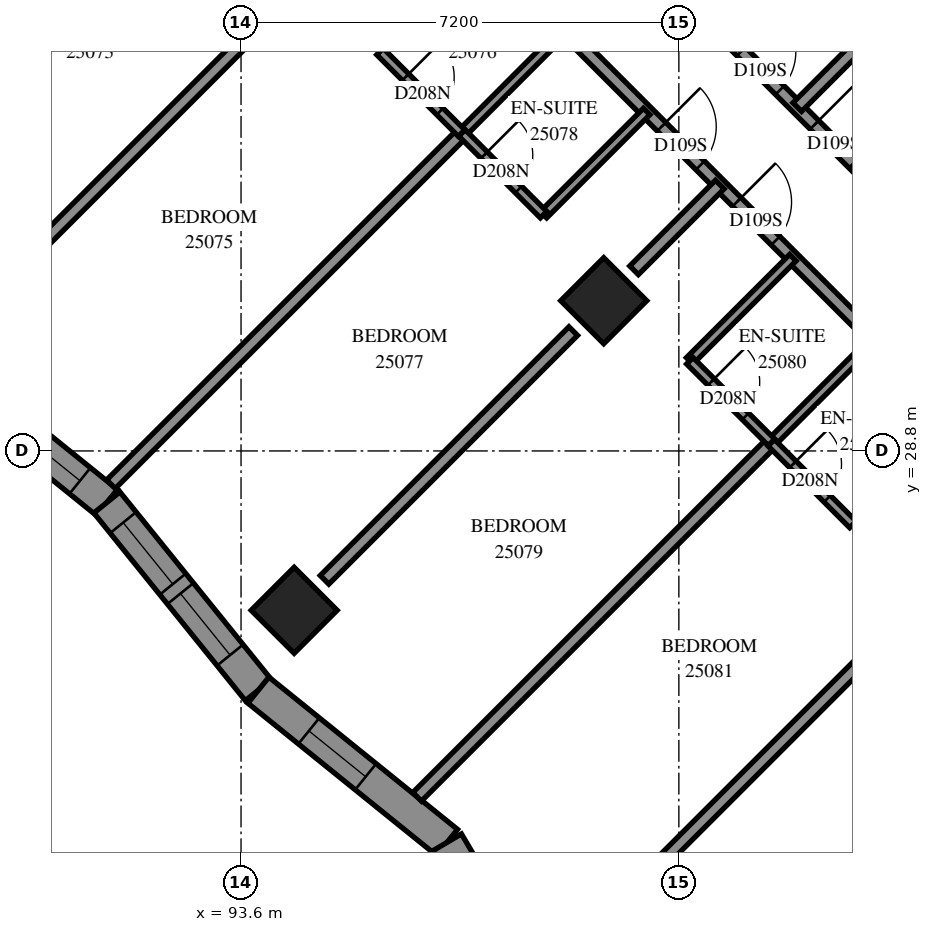
"""IFC4 building model, lengths in metres.
Left out: names, types, materials, properties, quantities, classifications, styles, units other than length and angle.
Written with IfcOpenShell. Run it as: python <this file> out.ifc"""

import sys

from ifc_helpers import new_model, si_unit, direction, frame, frame_2d, origin, origin_2d, place, context, subcontext, project, spatial, polyline, rectangle, outline, extrude, element, fill, save


model = new_model("IFC4")
c1 = context("Model", 3, precision=1e-05, world=origin(), true_north=direction((0.0, 1.0)))
c2 = subcontext(c1, "Body", "Model", "MODEL_VIEW")
j1 = project(units=[si_unit("LENGTHUNIT", "METRE"), si_unit("PLANEANGLEUNIT", "RADIAN")], contexts=[c1])
p1 = place(None, origin())
s1 = spatial("IfcSite", under=j1, at=p1, CompositionType="ELEMENT")
p2 = place(p1, origin())
s2 = spatial("IfcBuilding", under=s1, at=p2, CompositionType="ELEMENT")
p3 = place(p2, frame((0.0, 0.0, 94.8)))
s3 = spatial("IfcBuildingStorey", under=s2, at=p3, CompositionType="ELEMENT", Elevation=94.8)
for number, where, z_axis, x_axis in (
    (1, (99.565, 31.271, 0.0), (0.0, 0.0, 1.0), (0.707, -0.707, 0.0)),
    (2, (94.474, 26.18, 0.0), (0.0, 0.0, 1.0), (0.707, -0.707, 0.0)),
):
    element("IfcColumn", number, at=place(p3, frame(where, z_axis=z_axis, x_axis=x_axis)), inside=s3, PredefinedType="COLUMN", context=c2, shape_type="SweptSolid", body=[
        extrude(rectangle(XDim=1.0, YDim=1.0, at=origin_2d()), origin(), (0.0, 0.0, 1.0), 3.1),
    ])
p4 = place(p3, frame((88.308, 30.444, 0.0), z_axis=(0.0, 0.0, 1.0), x_axis=(0.7781705498, -0.6280530196, 0.0)))
e3 = element("IfcWall", 3, at=p4, inside=s3, PredefinedType="SOLIDWALL", context=c2, shape_type="SweptSolid", body=[
    extrude(outline(polyline([(-0.029, -0.275), (3.937, -0.275), (3.996, 0.275), (0.029, 0.275), (-0.029, -0.275)])), origin(), (0.0, 0.0, 1.0), 3.1),
])
p5 = place(p4, frame((0.598, 0.0, 0.5)))
e4 = element("IfcOpeningElement", 4, at=p5, cuts=e3, PredefinedType="OPENING", context=c2, shape_type="SweptSolid", body=[
    extrude(rectangle(XDim=1.3, YDim=2.45, at=frame_2d((0.65, 1.225))), frame((0.0, 0.285, 0.0), z_axis=(0.0, -1.0, 0.0), x_axis=(1.0, 0.0, 0.0)), (0.0, 0.0, 1.0), 0.57),
])
p6 = place(p4, frame((2.098, 0.0, 0.5)))
e5 = element("IfcOpeningElement", 5, at=p6, cuts=e3, PredefinedType="OPENING", context=c2, shape_type="SweptSolid", body=[
    extrude(rectangle(XDim=1.3, YDim=2.45, at=frame_2d((0.65, 1.225))), frame((0.0, 0.285, 0.0), z_axis=(0.0, -1.0, 0.0), x_axis=(1.0, 0.0, 0.0)), (0.0, 0.0, 1.0), 0.57),
])
p7 = place(p3, frame((91.394, 27.953, 0.0), z_axis=(0.0, 0.0, 1.0), x_axis=(0.6280530196, -0.7781705498, 0.0)))
e6 = element("IfcWall", 6, at=p7, inside=s3, PredefinedType="SOLIDWALL", context=c2, shape_type="SweptSolid", body=[
    extrude(outline(polyline([(0.029, -0.275), (3.996, -0.275), (3.937, 0.275), (-0.029, 0.275), (0.029, -0.275)])), origin(), (0.0, 0.0, 1.0), 3.1),
])
p8 = place(p7, frame((0.425, 0.0, 0.5)))
e7 = element("IfcOpeningElement", 7, at=p8, cuts=e6, PredefinedType="OPENING", context=c2, shape_type="SweptSolid", body=[
    extrude(rectangle(XDim=1.3, YDim=2.45, at=frame_2d((0.65, 1.225))), frame((0.0, 0.285, 0.0), z_axis=(0.0, -1.0, 0.0), x_axis=(1.0, 0.0, 0.0)), (0.0, 0.0, 1.0), 0.57),
])
p9 = place(p7, frame((1.925, 0.0, 0.5)))
e8 = element("IfcOpeningElement", 8, at=p9, cuts=e6, PredefinedType="OPENING", context=c2, shape_type="SweptSolid", body=[
    extrude(rectangle(XDim=1.3, YDim=2.45, at=frame_2d((0.65, 1.225))), frame((0.0, 0.285, 0.0), z_axis=(0.0, -1.0, 0.0), x_axis=(1.0, 0.0, 0.0)), (0.0, 0.0, 1.0), 0.57),
])
p10 = place(p3, frame((93.885, 24.867, 0.0), z_axis=(0.0, 0.0, 1.0), x_axis=(0.7781698309, -0.6280539103, 0.0)))
e9 = element("IfcWall", 9, at=p10, inside=s3, PredefinedType="SOLIDWALL", context=c2, shape_type="SweptSolid", body=[
    extrude(outline(polyline([(-0.029, -0.275), (3.937, -0.275), (4.037, 0.275), (0.029, 0.275), (-0.029, -0.275)])), origin(), (0.0, 0.0, 1.0), 3.1),
])
p11 = place(p10, frame((1.067, 0.0, 0.5)))
e10 = element("IfcOpeningElement", 10, at=p11, cuts=e9, PredefinedType="OPENING", context=c2, shape_type="SweptSolid", body=[
    extrude(rectangle(XDim=1.2, YDim=2.45, at=frame_2d((0.6, 1.225))), frame((0.0, 0.285, 0.0), z_axis=(0.0, -1.0, 0.0), x_axis=(1.0, 0.0, 0.0)), (0.0, 0.0, 1.0), 0.57),
])
p12 = place(p3, frame((96.988, 22.363, 0.0), z_axis=(0.0, 0.0, 1.0), x_axis=(0.507326266, -0.86175406, 0.0)))
e11 = element("IfcWall", 11, at=p12, inside=s3, PredefinedType="SOLIDWALL", context=c2, shape_type="SweptSolid", body=[
    extrude(outline(polyline([(0.05, -0.275), (4.124, -0.275), (3.67, 0.275), (-0.05, 0.275), (0.05, -0.275)])), origin(), (0.0, 0.0, 1.0), 3.1),
])
p13 = place(p12, frame((0.907, 0.0, 0.5)))
e12 = element("IfcOpeningElement", 12, at=p13, cuts=e11, PredefinedType="OPENING", context=c2, shape_type="SweptSolid", body=[
    extrude(rectangle(XDim=1.2, YDim=2.45, at=frame_2d((0.6, 1.225))), frame((0.0, 0.285, 0.0), z_axis=(0.0, -1.0, 0.0), x_axis=(1.0, 0.0, 0.0)), (0.0, 0.0, 1.0), 0.57),
])
p14 = place(p3, frame((93.339, 41.309, 0.0), z_axis=(0.0, 0.0, 1.0), x_axis=(0.7071067812, -0.7071067812, 0.0)))
e13 = element("IfcWall", 13, at=p14, inside=s3, PredefinedType="PARTITIONING", context=c2, shape_type="SweptSolid", body=[
    extrude(rectangle(XDim=18.702, YDim=0.2, at=frame_2d((9.351, 0.0))), origin(), (0.0, 0.0, 1.0), 3.1),
])
p15 = place(p14, frame((3.05, 0.0, 0.0)))
e14 = element("IfcOpeningElement", 14, at=p15, cuts=e13, PredefinedType="OPENING", context=c2, shape_type="SweptSolid", body=[
    extrude(rectangle(XDim=0.9, YDim=2.1, at=frame_2d((0.45, 1.05))), frame((0.0, 0.11, 0.0), z_axis=(0.0, -1.0, 0.0), x_axis=(1.0, 0.0, 0.0)), (0.0, 0.0, 1.0), 0.22),
])
p16 = place(p14, frame((4.7, 0.0, 0.0)))
e15 = element("IfcOpeningElement", 15, at=p16, cuts=e13, PredefinedType="OPENING", context=c2, shape_type="SweptSolid", body=[
    extrude(rectangle(XDim=0.9, YDim=2.1, at=frame_2d((0.45, 1.05))), frame((0.0, 0.11, 0.0), z_axis=(0.0, -1.0, 0.0), x_axis=(1.0, 0.0, 0.0)), (0.0, 0.0, 1.0), 0.22),
])
p17 = place(p14, frame((10.149, 0.0, 0.0)))
e16 = element("IfcOpeningElement", 16, at=p17, cuts=e13, PredefinedType="OPENING", context=c2, shape_type="SweptSolid", body=[
    extrude(rectangle(XDim=0.9, YDim=2.1, at=frame_2d((0.45, 1.05))), frame((0.0, 0.11, 0.0), z_axis=(0.0, -1.0, 0.0), x_axis=(1.0, 0.0, 0.0)), (0.0, 0.0, 1.0), 0.22),
])
p18 = place(p14, frame((11.9, 0.0, 0.0)))
e17 = element("IfcOpeningElement", 17, at=p18, cuts=e13, PredefinedType="OPENING", context=c2, shape_type="SweptSolid", body=[
    extrude(rectangle(XDim=0.9, YDim=2.1, at=frame_2d((0.45, 1.05))), frame((0.0, 0.11, 0.0), z_axis=(0.0, -1.0, 0.0), x_axis=(1.0, 0.0, 0.0)), (0.0, 0.0, 1.0), 0.22),
])
p19 = place(p14, frame((17.45, 0.0, 0.0)))
e18 = element("IfcOpeningElement", 18, at=p19, cuts=e13, PredefinedType="OPENING", context=c2, shape_type="SweptSolid", body=[
    extrude(rectangle(XDim=0.9, YDim=2.1, at=frame_2d((0.45, 1.05))), frame((0.0, 0.11, 0.0), z_axis=(0.0, -1.0, 0.0), x_axis=(1.0, 0.0, 0.0)), (0.0, 0.0, 1.0), 0.22),
])
p20 = place(p3, frame((86.835, 34.806, 0.0), z_axis=(0.0, 0.0, 1.0), x_axis=(0.7071067812, 0.7071067812, 0.0)))
e19 = element("IfcWall", 19, at=p20, inside=s3, PredefinedType="PARTITIONING", context=c2, shape_type="SweptSolid", body=[
    extrude(rectangle(XDim=9.201, YDim=0.2, at=frame_2d((4.601, 0.0))), origin(), (0.0, 0.0, 1.0), 3.1),
])
p21 = place(p3, frame((96.496, 23.113, 0.0), z_axis=(0.0, 0.0, 1.0), x_axis=(0.7071067812, 0.7071067812, 0.0)))
e20 = element("IfcWall", 20, at=p21, inside=s3, PredefinedType="PARTITIONING", context=c2, shape_type="SweptSolid", body=[
    extrude(rectangle(XDim=8.24, YDim=0.2, at=frame_2d((4.12, 0.0))), origin(), (0.0, 0.0, 1.0), 3.1),
])
p22 = place(p3, frame((86.343, 33.316, 0.0), z_axis=(0.0, 0.0, 1.0), x_axis=(0.7069848641, 0.7072286772, 0.0)))
e21 = element("IfcWall", 21, at=p22, inside=s3, PredefinedType="PARTITIONING", context=c2, shape_type="SweptSolid", body=[
    extrude(rectangle(XDim=8.203, YDim=0.2, at=frame_2d((4.101, 0.0))), origin(), (0.0, 0.0, 1.0), 3.1),
])
p23 = place(p3, frame((91.461, 28.253, 0.0), z_axis=(0.0, 0.0, 1.0), x_axis=(0.7072231255, 0.7069904178, 0.0)))
e22 = element("IfcWall", 22, at=p23, inside=s3, PredefinedType="PARTITIONING", context=c2, shape_type="SweptSolid", body=[
    extrude(rectangle(XDim=8.165, YDim=0.2, at=frame_2d((4.082, 0.0))), origin(), (0.0, 0.0, 1.0), 3.1),
])
p24 = place(p3, frame((100.062, 21.588, 0.0), z_axis=(0.0, 0.0, 1.0), x_axis=(0.7071067812, 0.7071067812, 0.0)))
e23 = element("IfcWall", 23, at=p24, inside=s3, PredefinedType="PARTITIONING", context=c2, shape_type="SweptSolid", body=[
    extrude(rectangle(XDim=5.79, YDim=0.2, at=frame_2d((2.895, 0.0))), origin(), (0.0, 0.0, 1.0), 2.6),
])
p25 = place(p3, frame((89.881, 31.771, 0.0), z_axis=(0.0, 0.0, 1.0), x_axis=(0.7071067812, 0.7071067812, 0.0)))
e24 = element("IfcWall", 24, at=p25, inside=s3, PredefinedType="PARTITIONING", context=c2, shape_type="SweptSolid", body=[
    extrude(rectangle(XDim=5.787, YDim=0.2, at=frame_2d((2.893, 0.0))), origin(), (0.0, 0.0, 1.0), 3.1),
])
p26 = place(p3, frame((94.973, 26.681, 0.0), z_axis=(0.0, 0.0, 1.0), x_axis=(0.7071067812, 0.7071067812, 0.0)))
e25 = element("IfcWall", 25, at=p26, inside=s3, PredefinedType="PARTITIONING", context=c2, shape_type="SweptSolid", body=[
    extrude(rectangle(XDim=5.784, YDim=0.2, at=frame_2d((2.892, 0.0))), origin(), (0.0, 0.0, 1.0), 3.1),
])
p27 = place(p3, frame((101.541, 35.651, 0.0), z_axis=(0.0, 0.0, 1.0), x_axis=(0.7071067812, -0.7071067812, 0.0)))
e26 = element("IfcWall", 26, at=p27, inside=s3, PredefinedType="PARTITIONING", context=c2, shape_type="SweptSolid", body=[
    extrude(rectangle(XDim=3.4, YDim=0.2, at=frame_2d((1.7, 0.0))), origin(), (0.0, 0.0, 1.0), 3.1),
])
p28 = place(p27, frame((0.4, 0.0, 0.0)))
e27 = element("IfcOpeningElement", 27, at=p28, cuts=e26, PredefinedType="OPENING", context=c2, shape_type="SweptSolid", body=[
    extrude(rectangle(XDim=0.9, YDim=2.1, at=frame_2d((0.45, 1.05))), frame((0.0, 0.11, 0.0), z_axis=(0.0, -1.0, 0.0), x_axis=(1.0, 0.0, 0.0)), (0.0, 0.0, 1.0), 0.22),
])
p29 = place(p27, frame((2.105, 0.0, 0.0)))
e28 = element("IfcOpeningElement", 28, at=p29, cuts=e26, PredefinedType="OPENING", context=c2, shape_type="SweptSolid", body=[
    extrude(rectangle(XDim=0.9, YDim=2.1, at=frame_2d((0.45, 1.05))), frame((0.0, 0.11, 0.0), z_axis=(0.0, -1.0, 0.0), x_axis=(1.0, 0.0, 0.0)), (0.0, 0.0, 1.0), 0.22),
])
for number, where, z_axis, x_axis in (
    (29, (100.977, 30.281, 0.0), (0.0, 0.0, 1.0), (0.707, 0.707, 0.0)),
    (30, (98.573, 32.685, 0.0), (0.0, 0.0, 1.0), (0.707, 0.707, 0.0)),
):
    element("IfcWall", number, at=place(p3, frame(where, z_axis=z_axis, x_axis=x_axis)), inside=s3, PredefinedType="PARTITIONING", context=c2, shape_type="SweptSolid", body=[
        extrude(rectangle(XDim=2.401, YDim=0.15, at=frame_2d((1.201, 0.0))), origin(), (0.0, 0.0, 1.0), 3.1),
    ])
p30 = place(p3, frame((97.234, 34.026, 0.0), z_axis=(0.0, 0.0, 1.0), x_axis=(0.706689978, 0.7075233388, 0.0)))
e31 = element("IfcWall", 31, at=p30, inside=s3, PredefinedType="PARTITIONING", context=c2, shape_type="SweptSolid", body=[
    extrude(rectangle(XDim=2.4, YDim=0.15, at=frame_2d((1.2, 0.0))), origin(), (0.0, 0.0, 1.0), 3.1),
])
for number, where, z_axis, x_axis in (
    (32, (95.887, 35.373, 0.0), (0.0, 0.0, 1.0), (0.707, 0.707, 0.0)),
    (33, (102.323, 28.939, 0.0), (0.0, 0.0, 1.0), (0.707, 0.707, 0.0)),
    (34, (103.665, 27.595, 0.0), (0.0, 0.0, 1.0), (0.707, 0.707, 0.0)),
):
    element("IfcWall", number, at=place(p3, frame(where, z_axis=z_axis, x_axis=x_axis)), inside=s3, PredefinedType="PARTITIONING", context=c2, shape_type="SweptSolid", body=[
        extrude(rectangle(XDim=2.398, YDim=0.15, at=frame_2d((1.199, 0.0))), origin(), (0.0, 0.0, 1.0), 3.1),
    ])
p31 = place(p3, frame((100.063, 31.771, 0.0), z_axis=(0.0, 0.0, 1.0), x_axis=(0.7071067812, 0.7071067812, 0.0)))
e35 = element("IfcWall", 35, at=p31, inside=s3, PredefinedType="PARTITIONING", context=c2, shape_type="SweptSolid", body=[
    extrude(rectangle(XDim=1.994, YDim=0.2, at=frame_2d((0.997, 0.0))), origin(), (0.0, 0.0, 1.0), 3.1),
])
p32 = place(p3, frame((102.747, 34.455, 0.0), z_axis=(0.0, 0.0, 1.0), x_axis=(0.7071067812, 0.7071067812, 0.0)))
e36 = element("IfcWall", 36, at=p32, inside=s3, PredefinedType="PARTITIONING", context=c2, shape_type="SweptSolid", body=[
    extrude(rectangle(XDim=1.991, YDim=0.2, at=frame_2d((0.996, 0.0))), origin(), (0.0, 0.0, 1.0), 3.1),
])
p33 = place(p3, frame((95.885, 35.369, 0.0), z_axis=(0.0, 0.0, 1.0), x_axis=(0.7071067812, -0.7071067812, 0.0)))
e37 = element("IfcWall", 37, at=p33, inside=s3, PredefinedType="PARTITIONING", context=c2, shape_type="SweptSolid", body=[
    extrude(rectangle(XDim=1.901, YDim=0.15, at=frame_2d((0.95, 0.0))), origin(), (0.0, 0.0, 1.0), 3.1),
])
p34 = place(p33, frame((0.595, 0.0, 0.0)))
e38 = element("IfcOpeningElement", 38, at=p34, cuts=e37, PredefinedType="OPENING", context=c2, shape_type="SweptSolid", body=[
    extrude(rectangle(XDim=0.8, YDim=2.1, at=frame_2d((0.4, 1.05))), frame((0.0, 0.085, 0.0), z_axis=(0.0, -1.0, 0.0), x_axis=(1.0, 0.0, 0.0)), (0.0, 0.0, 1.0), 0.17),
])
p35 = place(p3, frame((100.981, 30.283, 0.0), z_axis=(0.0, 0.0, 1.0), x_axis=(0.7076330979, -0.7065800724, 0.0)))
e39 = element("IfcWall", 39, at=p35, inside=s3, PredefinedType="PARTITIONING", context=c2, shape_type="SweptSolid", body=[
    extrude(rectangle(XDim=1.899, YDim=0.15, at=frame_2d((0.95, 0.0))), origin(), (0.0, 0.0, 1.0), 3.1),
])
p36 = place(p35, frame((0.493, 0.0, 0.0)))
e40 = element("IfcOpeningElement", 40, at=p36, cuts=e39, PredefinedType="OPENING", context=c2, shape_type="SweptSolid", body=[
    extrude(rectangle(XDim=0.8, YDim=2.1, at=frame_2d((0.4, 1.05))), frame((0.0, 0.085, 0.0), z_axis=(0.0, -1.0, 0.0), x_axis=(1.0, 0.0, 0.0)), (0.0, 0.0, 1.0), 0.17),
])
p37 = place(p3, frame((97.233, 34.029, 0.0), z_axis=(0.0, 0.0, 1.0), x_axis=(0.7065800724, -0.7076330979, 0.0)))
e41 = element("IfcWall", 41, at=p37, inside=s3, PredefinedType="PARTITIONING", context=c2, shape_type="SweptSolid", body=[
    extrude(rectangle(XDim=1.899, YDim=0.15, at=frame_2d((0.95, 0.0))), origin(), (0.0, 0.0, 1.0), 3.1),
])
p38 = place(p37, frame((0.515, 0.0, 0.0)))
e42 = element("IfcOpeningElement", 42, at=p38, cuts=e41, PredefinedType="OPENING", context=c2, shape_type="SweptSolid", body=[
    extrude(rectangle(XDim=0.8, YDim=2.1, at=frame_2d((0.4, 1.05))), frame((0.0, 0.085, 0.0), z_axis=(0.0, -1.0, 0.0), x_axis=(1.0, 0.0, 0.0)), (0.0, 0.0, 1.0), 0.17),
])
p39 = place(p3, frame((102.321, 28.935, 0.0), z_axis=(0.0, 0.0, 1.0), x_axis=(0.7065800724, -0.7076330979, 0.0)))
e43 = element("IfcWall", 43, at=p39, inside=s3, PredefinedType="PARTITIONING", context=c2, shape_type="SweptSolid", body=[
    extrude(rectangle(XDim=1.899, YDim=0.15, at=frame_2d((0.95, 0.0))), origin(), (0.0, 0.0, 1.0), 3.1),
])
p40 = place(p39, frame((0.501, 0.0, 0.0)))
e44 = element("IfcOpeningElement", 44, at=p40, cuts=e43, PredefinedType="OPENING", context=c2, shape_type="SweptSolid", body=[
    extrude(rectangle(XDim=0.8, YDim=2.1, at=frame_2d((0.4, 1.05))), frame((0.0, 0.085, 0.0), z_axis=(0.0, -1.0, 0.0), x_axis=(1.0, 0.0, 0.0)), (0.0, 0.0, 1.0), 0.17),
])
p41 = place(p6, origin())
e45 = element("IfcWindow", 45, at=p41, inside=s3, PartitioningType="SINGLE_PANEL", PredefinedType="WINDOW", context=c2, shape_type="SweptSolid", body=[
    extrude(rectangle(XDim=1.3, YDim=2.45, at=frame_2d((0.65, 1.225))), frame((0.0, 0.155, 0.0), z_axis=(0.0, -1.0, 0.0), x_axis=(1.0, 0.0, 0.0)), (0.0, 0.0, 1.0), 0.06),
])
fill(e5, e45)
p42 = place(p8, origin())
e46 = element("IfcWindow", 46, at=p42, inside=s3, PartitioningType="SINGLE_PANEL", PredefinedType="WINDOW", context=c2, shape_type="SweptSolid", body=[
    extrude(rectangle(XDim=1.3, YDim=2.45, at=frame_2d((0.65, 1.225))), frame((0.0, 0.155, 0.0), z_axis=(0.0, -1.0, 0.0), x_axis=(1.0, 0.0, 0.0)), (0.0, 0.0, 1.0), 0.06),
])
fill(e7, e46)
p43 = place(p9, origin())
e47 = element("IfcWindow", 47, at=p43, inside=s3, PartitioningType="SINGLE_PANEL", PredefinedType="WINDOW", context=c2, shape_type="SweptSolid", body=[
    extrude(rectangle(XDim=1.3, YDim=2.45, at=frame_2d((0.65, 1.225))), frame((0.0, 0.155, 0.0), z_axis=(0.0, -1.0, 0.0), x_axis=(1.0, 0.0, 0.0)), (0.0, 0.0, 1.0), 0.06),
])
fill(e8, e47)
p44 = place(p11, origin())
e48 = element("IfcWindow", 48, at=p44, inside=s3, PartitioningType="SINGLE_PANEL", PredefinedType="WINDOW", context=c2, shape_type="SweptSolid", body=[
    extrude(rectangle(XDim=1.2, YDim=2.45, at=frame_2d((0.6, 1.225))), frame((0.0, 0.155, 0.0), z_axis=(0.0, -1.0, 0.0), x_axis=(1.0, 0.0, 0.0)), (0.0, 0.0, 1.0), 0.06),
])
fill(e10, e48)
p45 = place(p28, origin())
e49 = element("IfcDoor", 49, at=p45, inside=s3, OperationType="SINGLE_SWING_RIGHT", PredefinedType="DOOR", context=c2, shape_type="SweptSolid", body=[
    extrude(rectangle(XDim=0.9, YDim=2.1, at=frame_2d((0.45, 1.05))), frame((0.0, 0.025, 0.0), z_axis=(0.0, -1.0, 0.0), x_axis=(1.0, 0.0, 0.0)), (0.0, 0.0, 1.0), 0.05),
])
fill(e27, e49)
p46 = place(p29, origin())
e50 = element("IfcDoor", 50, at=p46, inside=s3, OperationType="SINGLE_SWING_LEFT", PredefinedType="DOOR", context=c2, shape_type="SweptSolid", body=[
    extrude(rectangle(XDim=0.9, YDim=2.1, at=frame_2d((0.45, 1.05))), frame((0.0, 0.025, 0.0), z_axis=(0.0, -1.0, 0.0), x_axis=(1.0, 0.0, 0.0)), (0.0, 0.0, 1.0), 0.05),
])
fill(e28, e50)
p47 = place(p34, origin())
e51 = element("IfcDoor", 51, at=p47, inside=s3, OperationType="SINGLE_SWING_RIGHT", PredefinedType="DOOR", context=c2, shape_type="SweptSolid", body=[
    extrude(rectangle(XDim=0.8, YDim=2.1, at=frame_2d((0.4, 1.05))), frame((0.0, 0.025, 0.0), z_axis=(0.0, -1.0, 0.0), x_axis=(1.0, 0.0, 0.0)), (0.0, 0.0, 1.0), 0.05),
])
fill(e38, e51)
p48 = place(p17, origin())
e52 = element("IfcDoor", 52, at=p48, inside=s3, OperationType="SINGLE_SWING_LEFT", PredefinedType="DOOR", context=c2, shape_type="SweptSolid", body=[
    extrude(rectangle(XDim=0.9, YDim=2.1, at=frame_2d((0.45, 1.05))), frame((0.0, 0.025, 0.0), z_axis=(0.0, -1.0, 0.0), x_axis=(1.0, 0.0, 0.0)), (0.0, 0.0, 1.0), 0.05),
])
fill(e16, e52)
p49 = place(p38, origin())
e53 = element("IfcDoor", 53, at=p49, inside=s3, OperationType="SINGLE_SWING_RIGHT", PredefinedType="DOOR", context=c2, shape_type="SweptSolid", body=[
    extrude(rectangle(XDim=0.8, YDim=2.1, at=frame_2d((0.4, 1.05))), frame((0.0, 0.025, 0.0), z_axis=(0.0, -1.0, 0.0), x_axis=(1.0, 0.0, 0.0)), (0.0, 0.0, 1.0), 0.05),
])
fill(e42, e53)
p50 = place(p18, origin())
e54 = element("IfcDoor", 54, at=p50, inside=s3, OperationType="SINGLE_SWING_RIGHT", PredefinedType="DOOR", context=c2, shape_type="SweptSolid", body=[
    extrude(rectangle(XDim=0.9, YDim=2.1, at=frame_2d((0.45, 1.05))), frame((0.0, 0.025, 0.0), z_axis=(0.0, -1.0, 0.0), x_axis=(1.0, 0.0, 0.0)), (0.0, 0.0, 1.0), 0.05),
])
fill(e17, e54)
p51 = place(p36, origin())
e55 = element("IfcDoor", 55, at=p51, inside=s3, OperationType="SINGLE_SWING_RIGHT", PredefinedType="DOOR", context=c2, shape_type="SweptSolid", body=[
    extrude(rectangle(XDim=0.8, YDim=2.1, at=frame_2d((0.4, 1.05))), frame((0.0, 0.025, 0.0), z_axis=(0.0, -1.0, 0.0), x_axis=(1.0, 0.0, 0.0)), (0.0, 0.0, 1.0), 0.05),
])
fill(e40, e55)
p52 = place(p40, origin())
e56 = element("IfcDoor", 56, at=p52, inside=s3, OperationType="SINGLE_SWING_RIGHT", PredefinedType="DOOR", context=c2, shape_type="SweptSolid", body=[
    extrude(rectangle(XDim=0.8, YDim=2.1, at=frame_2d((0.4, 1.05))), frame((0.0, 0.025, 0.0), z_axis=(0.0, -1.0, 0.0), x_axis=(1.0, 0.0, 0.0)), (0.0, 0.0, 1.0), 0.05),
])
fill(e44, e56)
save(model, sys.argv[1])
